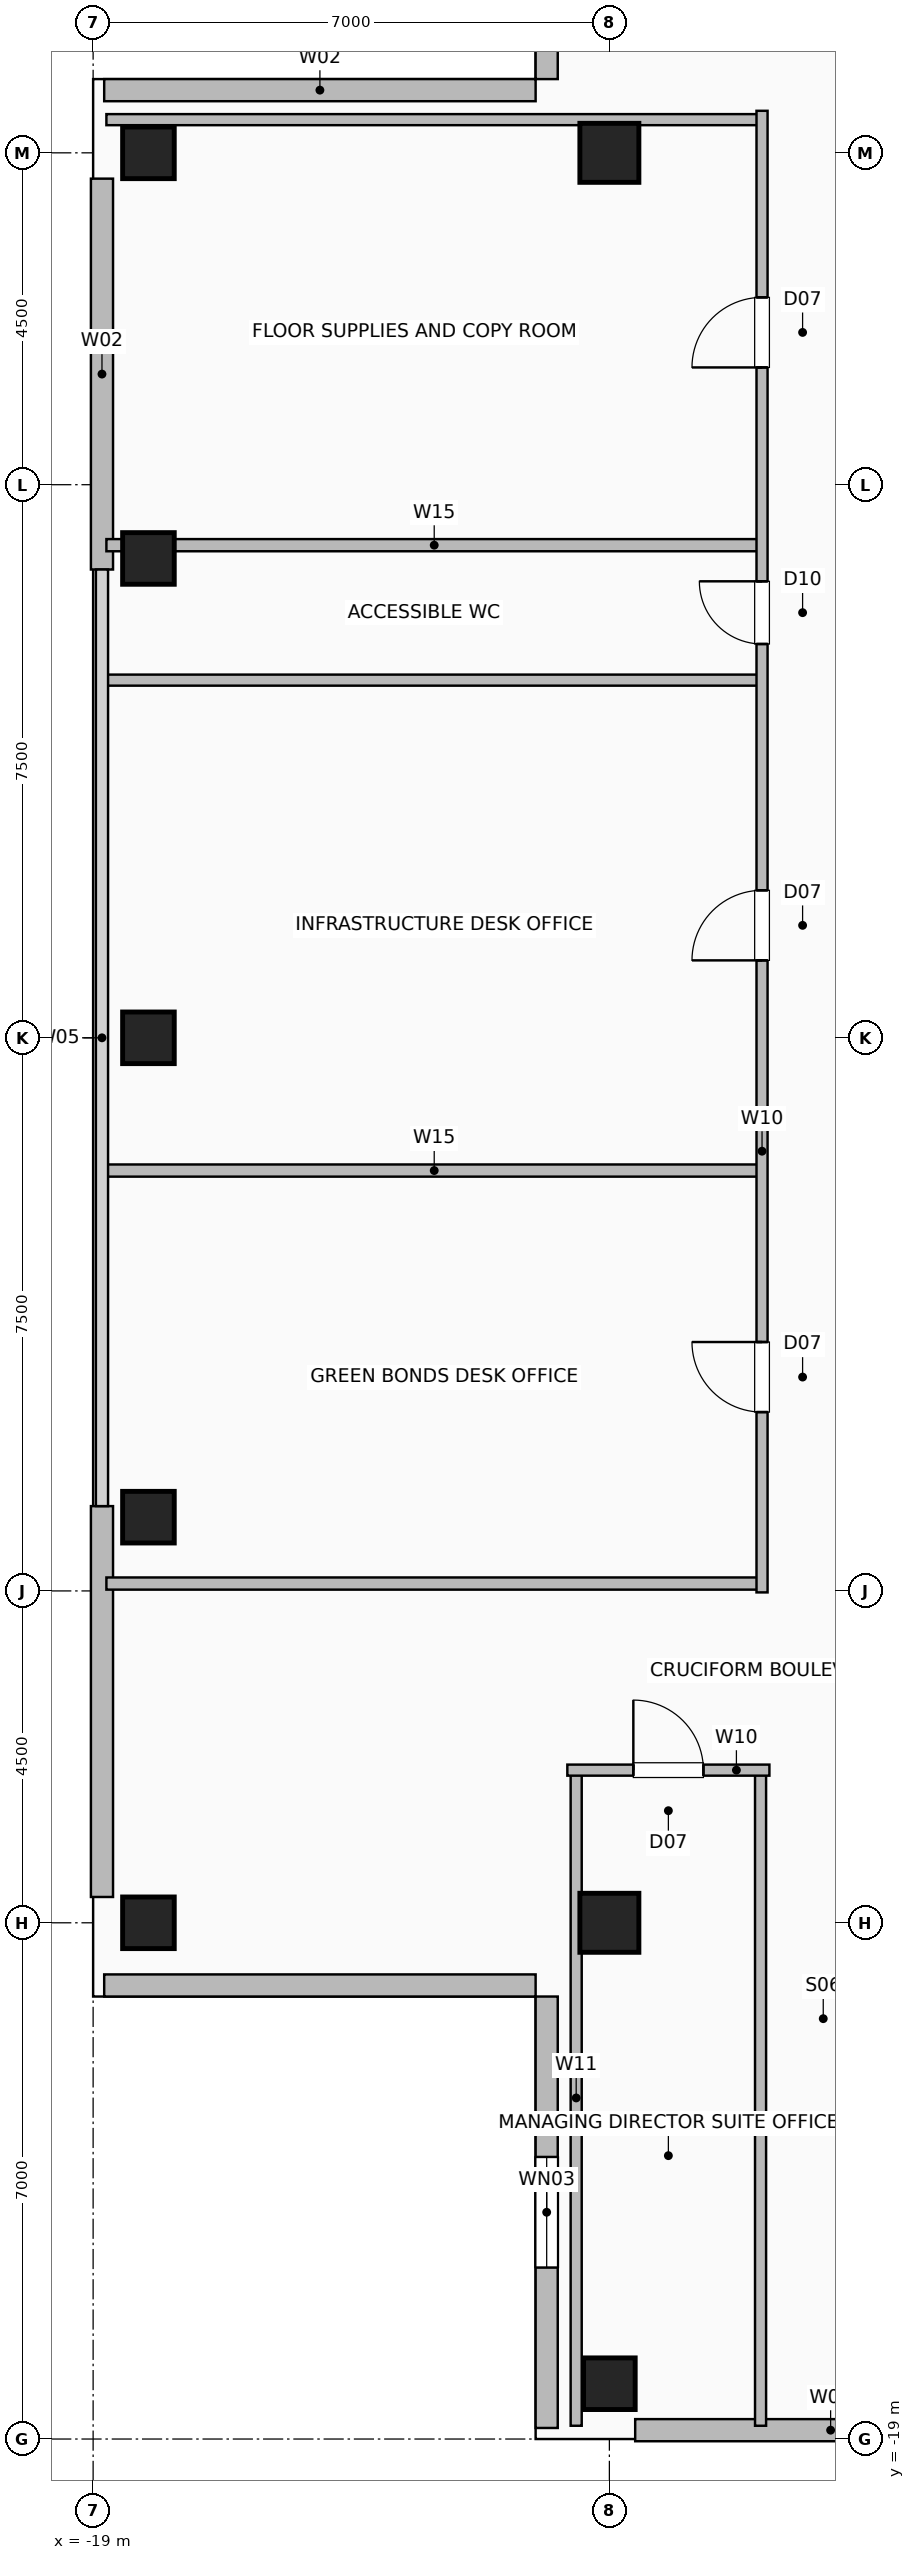
"""IFC4 building model, lengths in metres.
Left out: names, types, materials, properties, quantities, classifications, styles, units other than length and angle.
Written with IfcOpenShell. Run it as: python <this file> out.ifc"""

import sys

from ifc_helpers import new_model, si_unit, direction, frame, frame_2d, origin, origin_2d, place, context, subcontext, project, spatial, rectangle, hollow_rectangle, extrude, element, fill, save


model = new_model("IFC4")
c1 = context("Model", 3, precision=1e-05, world=origin(), true_north=direction((0.0, 1.0)))
c2 = subcontext(c1, "Body", "Model", "MODEL_VIEW")
j1 = project(units=[si_unit("LENGTHUNIT", "METRE"), si_unit("PLANEANGLEUNIT", "RADIAN")], contexts=[c1])
p1 = place(None, origin())
s1 = spatial("IfcSite", under=j1, at=p1, CompositionType="ELEMENT")
p2 = place(p1, origin())
s2 = spatial("IfcBuilding", under=s1, at=p2, CompositionType="ELEMENT")
p3 = place(p2, frame((0.0, 0.0, 279.2)))
s3 = spatial("IfcBuildingStorey", under=s2, at=p3, CompositionType="ELEMENT", Elevation=279.2)
for number, where, z_axis, x_axis in (
    (1, (-12.0, -18.25, 0.0), (0.0, 0.0, 1.0), (1.0, 0.0, 0.0)),
    (2, (-18.25, -12.0, 0.0), (0.0, 0.0, 1.0), (1.0, 0.0, 0.0)),
    (3, (-18.25, -6.5, 0.0), (0.0, 0.0, 1.0), (1.0, 0.0, 0.0)),
    (4, (-18.25, 0.0, 0.0), (0.0, 0.0, 1.0), (1.0, 0.0, 0.0)),
    (5, (-18.25, 6.5, 0.0), (0.0, 0.0, 1.0), (1.0, 0.0, 0.0)),
    (6, (-18.25, 12.0, 0.0), (0.0, 0.0, 1.0), (1.0, 0.0, 0.0)),
):
    element("IfcColumn", number, at=place(p3, frame(where, z_axis=z_axis, x_axis=x_axis)), inside=s3, PredefinedType="COLUMN", context=c2, shape_type="SweptSolid", body=[
        extrude(hollow_rectangle(XDim=0.7, YDim=0.7, WallThickness=0.035, at=origin_2d()), origin(), (0.0, 0.0, 1.0), 3.6),
    ])
for number, where, z_axis, x_axis in (
    (7, (-12.0, -12.0, 0.0), (0.0, 0.0, 1.0), (1.0, 0.0, 0.0)),
    (8, (-12.0, 12.0, 0.0), (0.0, 0.0, 1.0), (1.0, 0.0, 0.0)),
):
    element("IfcColumn", number, at=place(p3, frame(where, z_axis=z_axis, x_axis=x_axis)), inside=s3, PredefinedType="COLUMN", context=c2, shape_type="SweptSolid", body=[
        extrude(hollow_rectangle(XDim=0.8, YDim=0.8, WallThickness=0.04, at=origin_2d()), origin(), (0.0, 0.0, 1.0), 3.6),
    ])
for number, where, z_axis, x_axis in (
    (9, (-11.65, -18.88, 0.0), (0.0, 0.0, 1.0), (1.0, 0.0, 0.0)),
    (10, (-18.88, -11.65, 0.0), (0.0, 0.0, 1.0), (0.0, 1.0, 0.0)),
    (11, (-18.88, 6.35, 0.0), (0.0, 0.0, 1.0), (0.0, 1.0, 0.0)),
):
    element("IfcWall", number, at=place(p3, frame(where, z_axis=z_axis, x_axis=x_axis)), inside=s3, PredefinedType="SOLIDWALL", context=c2, shape_type="SweptSolid", body=[
        extrude(rectangle(XDim=5.3, YDim=0.3, at=frame_2d((2.65, 0.0))), origin(), (0.0, 0.0, 1.0), 3.36),
    ])
p4 = place(p3, frame((-12.85, -18.85, 0.0), z_axis=(0.0, 0.0, 1.0), x_axis=(0.0, 1.0, 0.0)))
e12 = element("IfcWall", 12, at=p4, inside=s3, PredefinedType="SOLIDWALL", context=c2, shape_type="SweptSolid", body=[
    extrude(rectangle(XDim=5.85, YDim=0.3, at=frame_2d((2.925, 0.0))), origin(), (0.0, 0.0, 1.0), 3.36),
])
p5 = place(p4, frame((2.175, 0.0, 0.9)))
e13 = element("IfcOpeningElement", 13, at=p5, cuts=e12, PredefinedType="OPENING", context=c2, shape_type="SweptSolid", body=[
    extrude(rectangle(XDim=1.5, YDim=1.8, at=frame_2d((0.75, 0.9))), frame((0.0, 0.16, 0.0), z_axis=(0.0, -1.0, 0.0), x_axis=(1.0, 0.0, 0.0)), (0.0, 0.0, 1.0), 0.32),
])
p6 = place(p3, frame((-18.85, -12.85, 0.0), z_axis=(0.0, 0.0, 1.0), x_axis=(1.0, 0.0, 0.0)))
e14 = element("IfcWall", 14, at=p6, inside=s3, PredefinedType="SOLIDWALL", context=c2, shape_type="SweptSolid", body=[
    extrude(rectangle(XDim=5.85, YDim=0.3, at=frame_2d((2.925, 0.0))), origin(), (0.0, 0.0, 1.0), 3.36),
])
p7 = place(p3, frame((-12.85, 18.85, 0.0), z_axis=(0.0, 0.0, 1.0), x_axis=(0.0, -1.0, 0.0)))
e15 = element("IfcWall", 15, at=p7, inside=s3, PredefinedType="SOLIDWALL", context=c2, shape_type="SweptSolid", body=[
    extrude(rectangle(XDim=5.85, YDim=0.3, at=frame_2d((2.925, 0.0))), origin(), (0.0, 0.0, 1.0), 3.36),
])
p8 = place(p7, frame((2.175, 0.0, 0.9)))
e16 = element("IfcOpeningElement", 16, at=p8, cuts=e15, PredefinedType="OPENING", context=c2, shape_type="SweptSolid", body=[
    extrude(rectangle(XDim=1.5, YDim=1.8, at=frame_2d((0.75, 0.9))), frame((0.0, 0.16, 0.0), z_axis=(0.0, -1.0, 0.0), x_axis=(1.0, 0.0, 0.0)), (0.0, 0.0, 1.0), 0.32),
])
p9 = place(p3, frame((-18.85, 12.85, 0.0), z_axis=(0.0, 0.0, 1.0), x_axis=(1.0, 0.0, 0.0)))
e17 = element("IfcWall", 17, at=p9, inside=s3, PredefinedType="SOLIDWALL", context=c2, shape_type="SweptSolid", body=[
    extrude(rectangle(XDim=5.85, YDim=0.3, at=frame_2d((2.925, 0.0))), origin(), (0.0, 0.0, 1.0), 3.36),
])
for number, where, z_axis, x_axis in (
    (18, (-12.45, -18.82, 0.0), (0.0, 0.0, 1.0), (0.0, 1.0, 0.0)),
    (19, (-9.95, -18.82, 0.0), (0.0, 0.0, 1.0), (0.0, 1.0, 0.0)),
):
    element("IfcWall", number, at=place(p3, frame(where, z_axis=z_axis, x_axis=x_axis)), inside=s3, PredefinedType="PARTITIONING", context=c2, shape_type="SweptSolid", body=[
        extrude(rectangle(XDim=8.89, YDim=0.15, at=frame_2d((4.445, 0.0))), origin(), (0.0, 0.0, 1.0), 3.36),
    ])
p10 = place(p3, frame((-12.57, -9.93, 0.0), z_axis=(0.0, 0.0, 1.0), x_axis=(1.0, 0.0, 0.0)))
e20 = element("IfcWall", 20, at=p10, inside=s3, PredefinedType="PARTITIONING", context=c2, shape_type="SweptSolid", body=[
    extrude(rectangle(XDim=2.74, YDim=0.15, at=frame_2d((1.37, 0.0))), origin(), (0.0, 0.0, 1.0), 3.36),
])
p11 = place(p10, frame((0.895, 0.0, 0.0)))
e21 = element("IfcOpeningElement", 21, at=p11, cuts=e20, PredefinedType="OPENING", context=c2, shape_type="SweptSolid", body=[
    extrude(rectangle(XDim=0.95, YDim=2.06, at=frame_2d((0.475, 1.03))), frame((0.0, 0.085, 0.0), z_axis=(0.0, -1.0, 0.0), x_axis=(1.0, 0.0, 0.0)), (0.0, 0.0, 1.0), 0.17),
])
for number, where, z_axis, x_axis in (
    (22, (-18.82, 6.68, 0.0), (0.0, 0.0, 1.0), (1.0, 0.0, 0.0)),
    (23, (-18.82, -7.4, 0.0), (0.0, 0.0, 1.0), (1.0, 0.0, 0.0)),
    (24, (-18.82, -1.8, 0.0), (0.0, 0.0, 1.0), (1.0, 0.0, 0.0)),
):
    element("IfcWall", number, at=place(p3, frame(where, z_axis=z_axis, x_axis=x_axis)), inside=s3, PredefinedType="PLUMBINGWALL", context=c2, shape_type="SweptSolid", body=[
        extrude(rectangle(XDim=8.89, YDim=0.165, at=frame_2d((4.445, 0.0))), origin(), (0.0, 0.0, 1.0), 3.36),
    ])
for number, where, z_axis, x_axis in (
    (25, (-18.82, 4.85, 0.0), (0.0, 0.0, 1.0), (1.0, 0.0, 0.0)),
    (26, (-18.82, 12.45, 0.0), (0.0, 0.0, 1.0), (1.0, 0.0, 0.0)),
):
    element("IfcWall", number, at=place(p3, frame(where, z_axis=z_axis, x_axis=x_axis)), inside=s3, PredefinedType="PARTITIONING", context=c2, shape_type="SweptSolid", body=[
        extrude(rectangle(XDim=8.89, YDim=0.15, at=frame_2d((4.445, 0.0))), origin(), (0.0, 0.0, 1.0), 3.36),
    ])
p12 = place(p3, frame((-9.93, -7.52, 0.0), z_axis=(0.0, 0.0, 1.0), x_axis=(0.0, 1.0, 0.0)))
e27 = element("IfcWall", 27, at=p12, inside=s3, PredefinedType="PARTITIONING", context=c2, shape_type="SweptSolid", body=[
    extrude(rectangle(XDim=20.09, YDim=0.15, at=frame_2d((10.045, 0.0))), origin(), (0.0, 0.0, 1.0), 3.36),
])
p13 = place(p12, frame((2.445, 0.0, 0.0)))
e28 = element("IfcOpeningElement", 28, at=p13, cuts=e27, PredefinedType="OPENING", context=c2, shape_type="SweptSolid", body=[
    extrude(rectangle(XDim=0.95, YDim=2.06, at=frame_2d((0.475, 1.03))), frame((0.0, 0.085, 0.0), z_axis=(0.0, -1.0, 0.0), x_axis=(1.0, 0.0, 0.0)), (0.0, 0.0, 1.0), 0.17),
])
p14 = place(p12, frame((8.57, 0.0, 0.0)))
e29 = element("IfcOpeningElement", 29, at=p14, cuts=e27, PredefinedType="OPENING", context=c2, shape_type="SweptSolid", body=[
    extrude(rectangle(XDim=0.95, YDim=2.06, at=frame_2d((0.475, 1.03))), frame((0.0, 0.085, 0.0), z_axis=(0.0, -1.0, 0.0), x_axis=(1.0, 0.0, 0.0)), (0.0, 0.0, 1.0), 0.17),
])
p15 = place(p12, frame((12.86, 0.0, 0.0)))
e30 = element("IfcOpeningElement", 30, at=p15, cuts=e27, PredefinedType="OPENING", context=c2, shape_type="SweptSolid", body=[
    extrude(rectangle(XDim=0.85, YDim=2.05, at=frame_2d((0.425, 1.025))), frame((0.0, 0.085, 0.0), z_axis=(0.0, -1.0, 0.0), x_axis=(1.0, 0.0, 0.0)), (0.0, 0.0, 1.0), 0.17),
])
p16 = place(p12, frame((16.61, 0.0, 0.0)))
e31 = element("IfcOpeningElement", 31, at=p16, cuts=e27, PredefinedType="OPENING", context=c2, shape_type="SweptSolid", body=[
    extrude(rectangle(XDim=0.95, YDim=2.06, at=frame_2d((0.475, 1.03))), frame((0.0, 0.085, 0.0), z_axis=(0.0, -1.0, 0.0), x_axis=(1.0, 0.0, 0.0)), (0.0, 0.0, 1.0), 0.17),
])
p17 = place(p5, origin())
e32 = element("IfcWindow", 32, at=p17, inside=s3, PartitioningType="SINGLE_PANEL", PredefinedType="WINDOW", context=c2, shape_type="SweptSolid", body=[
    extrude(rectangle(XDim=1.5, YDim=1.8, at=frame_2d((0.75, 0.9))), frame((0.0, 0.03, 0.0), z_axis=(0.0, -1.0, 0.0), x_axis=(1.0, 0.0, 0.0)), (0.0, 0.0, 1.0), 0.06),
])
fill(e13, e32)
p18 = place(p11, origin())
e33 = element("IfcDoor", 33, at=p18, inside=s3, OperationType="SINGLE_SWING_LEFT", PredefinedType="DOOR", context=c2, shape_type="SweptSolid", body=[
    extrude(rectangle(XDim=0.95, YDim=2.06, at=frame_2d((0.475, 1.03))), frame((0.0, 0.025, 0.0), z_axis=(0.0, -1.0, 0.0), x_axis=(1.0, 0.0, 0.0)), (0.0, 0.0, 1.0), 0.05),
])
fill(e21, e33)
p19 = place(p13, origin())
e34 = element("IfcDoor", 34, at=p19, inside=s3, OperationType="SINGLE_SWING_RIGHT", PredefinedType="DOOR", context=c2, shape_type="SweptSolid", body=[
    extrude(rectangle(XDim=0.95, YDim=2.06, at=frame_2d((0.475, 1.03))), frame((0.0, 0.025, 0.0), z_axis=(0.0, -1.0, 0.0), x_axis=(1.0, 0.0, 0.0)), (0.0, 0.0, 1.0), 0.05),
])
fill(e28, e34)
p20 = place(p14, origin())
e35 = element("IfcDoor", 35, at=p20, inside=s3, OperationType="SINGLE_SWING_LEFT", PredefinedType="DOOR", context=c2, shape_type="SweptSolid", body=[
    extrude(rectangle(XDim=0.95, YDim=2.06, at=frame_2d((0.475, 1.03))), frame((0.0, 0.025, 0.0), z_axis=(0.0, -1.0, 0.0), x_axis=(1.0, 0.0, 0.0)), (0.0, 0.0, 1.0), 0.05),
])
fill(e29, e35)
p21 = place(p15, origin())
e36 = element("IfcDoor", 36, at=p21, inside=s3, OperationType="SINGLE_SWING_RIGHT", PredefinedType="DOOR", context=c2, shape_type="SweptSolid", body=[
    extrude(rectangle(XDim=0.85, YDim=2.05, at=frame_2d((0.425, 1.025))), frame((0.0, 0.025, 0.0), z_axis=(0.0, -1.0, 0.0), x_axis=(1.0, 0.0, 0.0)), (0.0, 0.0, 1.0), 0.05),
])
fill(e30, e36)
p22 = place(p16, origin())
e37 = element("IfcDoor", 37, at=p22, inside=s3, OperationType="SINGLE_SWING_LEFT", PredefinedType="DOOR", context=c2, shape_type="SweptSolid", body=[
    extrude(rectangle(XDim=0.95, YDim=2.06, at=frame_2d((0.475, 1.03))), frame((0.0, 0.025, 0.0), z_axis=(0.0, -1.0, 0.0), x_axis=(1.0, 0.0, 0.0)), (0.0, 0.0, 1.0), 0.05),
])
fill(e31, e37)
save(model, sys.argv[1])
